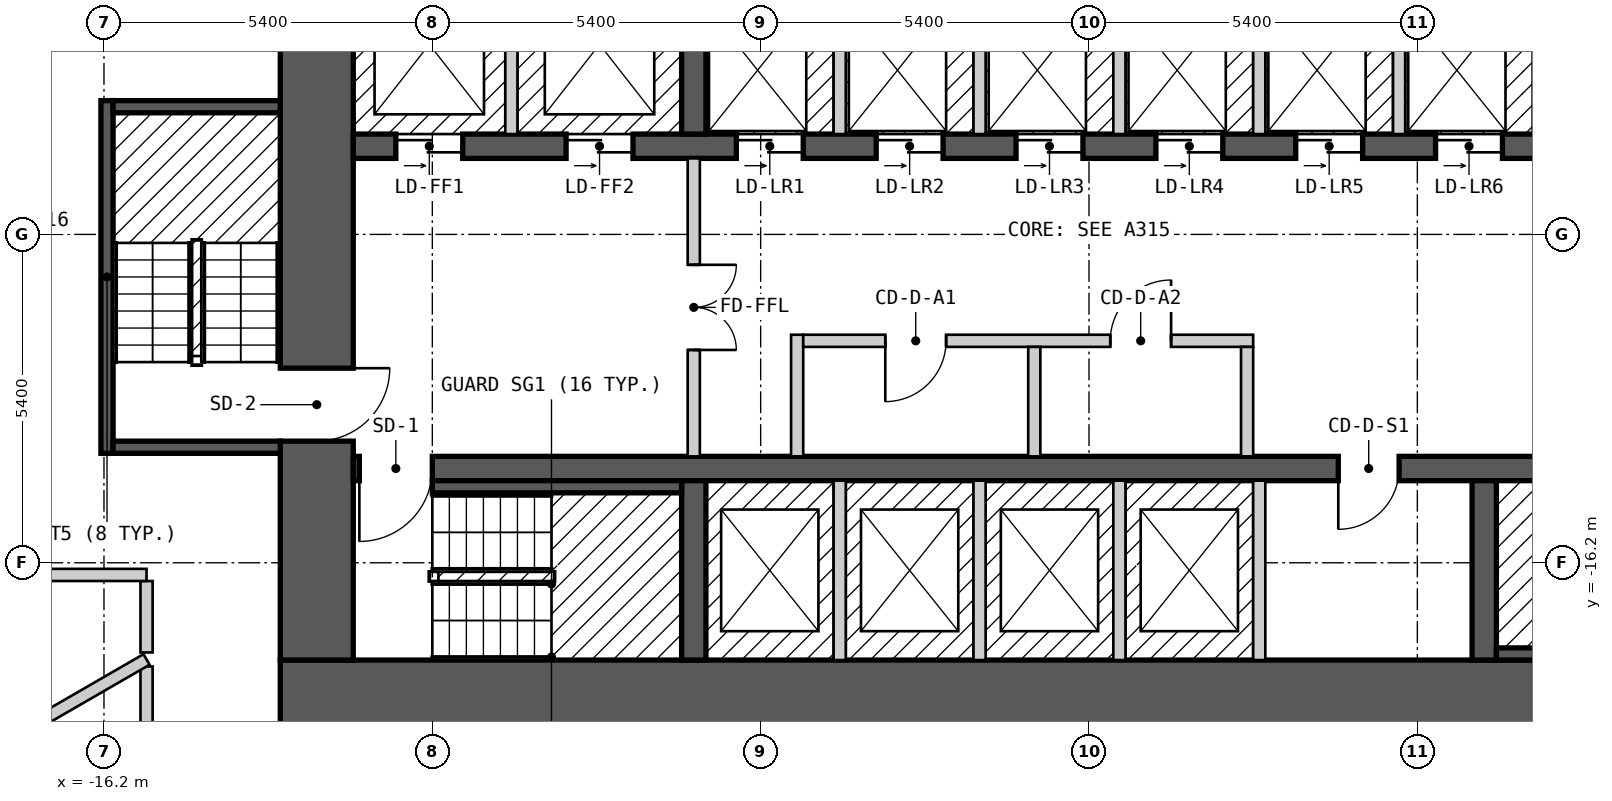
"""IFC4 building model, lengths in metres.
Left out: names, types, materials, properties, quantities, classifications, styles, units other than length and angle.
Written with IfcOpenShell. Run it as: python <this file> out.ifc"""

import sys

from ifc_helpers import new_model, si_unit, direction, frame, frame_2d, origin, place, context, subcontext, project, spatial, rectangle, extrude, element, fill, save


model = new_model("IFC4")
c1 = context("Model", 3, precision=1e-05, world=origin(), true_north=direction((0.0, 1.0)))
c2 = subcontext(c1, "Body", "Model", "MODEL_VIEW")
j1 = project(units=[si_unit("LENGTHUNIT", "METRE"), si_unit("PLANEANGLEUNIT", "RADIAN")], contexts=[c1])
p1 = place(None, origin())
s1 = spatial("IfcSite", under=j1, at=p1, CompositionType="ELEMENT")
p2 = place(p1, origin())
s2 = spatial("IfcBuilding", under=s1, at=p2, CompositionType="ELEMENT")
p3 = place(p2, frame((0.0, 0.0, 44.4)))
s3 = spatial("IfcBuildingStorey", under=s2, at=p3, CompositionType="ELEMENT", Elevation=44.4)
p4 = place(p3, frame((-13.3, -18.4, 0.0), z_axis=(0.0, 0.0, 1.0), x_axis=(1.0, 0.0, 0.0)))
e1 = element("IfcWall", 1, at=p4, inside=s3, PredefinedType="SHEAR", context=c2, shape_type="SweptSolid", body=[
    extrude(rectangle(XDim=26.6, YDim=1.2, at=frame_2d((13.3, 0.0))), origin(), (0.0, 0.0, 1.0), 2.7),
])
p5 = place(p3, frame((-12.7, -17.8, 0.0), z_axis=(0.0, 0.0, 1.0), x_axis=(0.0, 1.0, 0.0)))
e2 = element("IfcWall", 2, at=p5, inside=s3, PredefinedType="SHEAR", context=c2, shape_type="SweptSolid", body=[
    extrude(rectangle(XDim=11.6, YDim=1.2, at=frame_2d((5.8, 0.0))), origin(), (0.0, 0.0, 1.0), 2.7),
])
p6 = place(p5, frame((3.6, 0.0, 0.0)))
e3 = element("IfcOpeningElement", 3, at=p6, cuts=e2, PredefinedType="OPENING", context=c2, shape_type="SweptSolid", body=[
    extrude(rectangle(XDim=1.2, YDim=2.1, at=frame_2d((0.6, 1.05))), frame((0.0, 0.61, 0.0), z_axis=(0.0, -1.0, 0.0), x_axis=(1.0, 0.0, 0.0)), (0.0, 0.0, 1.0), 1.22),
])
p7 = place(p3, frame((-12.1, -14.65, 0.0), z_axis=(0.0, 0.0, 1.0), x_axis=(1.0, 0.0, 0.0)))
e4 = element("IfcWall", 4, at=p7, inside=s3, PredefinedType="SHEAR", context=c2, shape_type="SweptSolid", body=[
    extrude(rectangle(XDim=24.2, YDim=0.4, at=frame_2d((12.1, 0.0))), origin(), (0.0, 0.0, 1.0), 2.7),
])
p8 = place(p7, frame((1.3, 0.0, 0.0), z_axis=(0.0, 0.0, 1.0), x_axis=(-1.0, 0.0, 0.0)))
e5 = element("IfcOpeningElement", 5, at=p8, cuts=e4, PredefinedType="OPENING", context=c2, shape_type="SweptSolid", body=[
    extrude(rectangle(XDim=1.2, YDim=2.1, at=frame_2d((0.6, 1.05))), frame((0.0, 0.21, 0.0), z_axis=(0.0, -1.0, 0.0), x_axis=(1.0, 0.0, 0.0)), (0.0, 0.0, 1.0), 0.42),
])
p9 = place(p7, frame((24.15, 0.0, 0.0), z_axis=(0.0, 0.0, 1.0), x_axis=(-1.0, 0.0, 0.0)))
e6 = element("IfcOpeningElement", 6, at=p9, cuts=e4, PredefinedType="OPENING", context=c2, shape_type="SweptSolid", body=[
    extrude(rectangle(XDim=1.2, YDim=2.1, at=frame_2d((0.6, 1.05))), frame((0.0, 0.21, 0.0), z_axis=(0.0, -1.0, 0.0), x_axis=(1.0, 0.0, 0.0)), (0.0, 0.0, 1.0), 0.42),
])
p10 = place(p7, frame((17.2, 0.0, 0.0), z_axis=(0.0, 0.0, 1.0), x_axis=(-1.0, 0.0, 0.0)))
e7 = element("IfcOpeningElement", 7, at=p10, cuts=e4, PredefinedType="OPENING", context=c2, shape_type="SweptSolid", body=[
    extrude(rectangle(XDim=1.0, YDim=2.1, at=frame_2d((0.5, 1.05))), frame((0.0, 0.21, 0.0), z_axis=(0.0, -1.0, 0.0), x_axis=(1.0, 0.0, 0.0)), (0.0, 0.0, 1.0), 0.42),
])
p11 = place(p3, frame((-12.1, -9.35, 0.0), z_axis=(0.0, 0.0, 1.0), x_axis=(1.0, 0.0, 0.0)))
e8 = element("IfcWall", 8, at=p11, inside=s3, PredefinedType="SHEAR", context=c2, shape_type="SweptSolid", body=[
    extrude(rectangle(XDim=22.3, YDim=0.4, at=frame_2d((11.15, 0.0))), origin(), (0.0, 0.0, 1.0), 2.7),
])
p12 = place(p11, frame((0.7, 0.0, 0.0)))
e9 = element("IfcOpeningElement", 9, at=p12, cuts=e8, PredefinedType="OPENING", context=c2, shape_type="SweptSolid", body=[
    extrude(rectangle(XDim=1.1, YDim=2.1, at=frame_2d((0.55, 1.05))), frame((0.0, 0.21, 0.0), z_axis=(0.0, -1.0, 0.0), x_axis=(1.0, 0.0, 0.0)), (0.0, 0.0, 1.0), 0.42),
])
p13 = place(p11, frame((3.5, 0.0, 0.0)))
e10 = element("IfcOpeningElement", 10, at=p13, cuts=e8, PredefinedType="OPENING", context=c2, shape_type="SweptSolid", body=[
    extrude(rectangle(XDim=1.1, YDim=2.1, at=frame_2d((0.55, 1.05))), frame((0.0, 0.21, 0.0), z_axis=(0.0, -1.0, 0.0), x_axis=(1.0, 0.0, 0.0)), (0.0, 0.0, 1.0), 0.42),
])
p14 = place(p11, frame((6.3, 0.0, 0.0)))
e11 = element("IfcOpeningElement", 11, at=p14, cuts=e8, PredefinedType="OPENING", context=c2, shape_type="SweptSolid", body=[
    extrude(rectangle(XDim=1.1, YDim=2.1, at=frame_2d((0.55, 1.05))), frame((0.0, 0.21, 0.0), z_axis=(0.0, -1.0, 0.0), x_axis=(1.0, 0.0, 0.0)), (0.0, 0.0, 1.0), 0.42),
])
p15 = place(p11, frame((8.6, 0.0, 0.0)))
e12 = element("IfcOpeningElement", 12, at=p15, cuts=e8, PredefinedType="OPENING", context=c2, shape_type="SweptSolid", body=[
    extrude(rectangle(XDim=1.1, YDim=2.1, at=frame_2d((0.55, 1.05))), frame((0.0, 0.21, 0.0), z_axis=(0.0, -1.0, 0.0), x_axis=(1.0, 0.0, 0.0)), (0.0, 0.0, 1.0), 0.42),
])
p16 = place(p11, frame((10.9, 0.0, 0.0)))
e13 = element("IfcOpeningElement", 13, at=p16, cuts=e8, PredefinedType="OPENING", context=c2, shape_type="SweptSolid", body=[
    extrude(rectangle(XDim=1.1, YDim=2.1, at=frame_2d((0.55, 1.05))), frame((0.0, 0.21, 0.0), z_axis=(0.0, -1.0, 0.0), x_axis=(1.0, 0.0, 0.0)), (0.0, 0.0, 1.0), 0.42),
])
p17 = place(p11, frame((13.2, 0.0, 0.0)))
e14 = element("IfcOpeningElement", 14, at=p17, cuts=e8, PredefinedType="OPENING", context=c2, shape_type="SweptSolid", body=[
    extrude(rectangle(XDim=1.1, YDim=2.1, at=frame_2d((0.55, 1.05))), frame((0.0, 0.21, 0.0), z_axis=(0.0, -1.0, 0.0), x_axis=(1.0, 0.0, 0.0)), (0.0, 0.0, 1.0), 0.42),
])
p18 = place(p11, frame((15.5, 0.0, 0.0)))
e15 = element("IfcOpeningElement", 15, at=p18, cuts=e8, PredefinedType="OPENING", context=c2, shape_type="SweptSolid", body=[
    extrude(rectangle(XDim=1.1, YDim=2.1, at=frame_2d((0.55, 1.05))), frame((0.0, 0.21, 0.0), z_axis=(0.0, -1.0, 0.0), x_axis=(1.0, 0.0, 0.0)), (0.0, 0.0, 1.0), 0.42),
])
p19 = place(p11, frame((17.8, 0.0, 0.0)))
e16 = element("IfcOpeningElement", 16, at=p19, cuts=e8, PredefinedType="OPENING", context=c2, shape_type="SweptSolid", body=[
    extrude(rectangle(XDim=1.1, YDim=2.1, at=frame_2d((0.55, 1.05))), frame((0.0, 0.21, 0.0), z_axis=(0.0, -1.0, 0.0), x_axis=(1.0, 0.0, 0.0)), (0.0, 0.0, 1.0), 0.42),
])
p20 = place(p11, frame((20.2, 0.0, 0.0)))
e17 = element("IfcOpeningElement", 17, at=p20, cuts=e8, PredefinedType="OPENING", context=c2, shape_type="SweptSolid", body=[
    extrude(rectangle(XDim=1.1, YDim=2.1, at=frame_2d((0.55, 1.05))), frame((0.0, 0.21, 0.0), z_axis=(0.0, -1.0, 0.0), x_axis=(1.0, 0.0, 0.0)), (0.0, 0.0, 1.0), 0.42),
])
for number, where, z_axis, x_axis in (
    (18, (-6.5, -17.8, 0.0), (0.0, 0.0, 1.0), (0.0, 1.0, 0.0)),
    (19, (6.5, -17.8, 0.0), (0.0, 0.0, 1.0), (0.0, 1.0, 0.0)),
    (20, (-6.5, -9.15, 0.0), (0.0, 0.0, 1.0), (0.0, 1.0, 0.0)),
):
    element("IfcWall", number, at=place(p3, frame(where, z_axis=z_axis, x_axis=x_axis)), inside=s3, PredefinedType="SHEAR", context=c2, shape_type="SweptSolid", body=[
        extrude(rectangle(XDim=2.95, YDim=0.4, at=frame_2d((1.475, 0.0))), origin(), (0.0, 0.0, 1.0), 2.7),
    ])
p21 = place(p3, frame((-15.5, -16.5, 0.0), z_axis=(0.0, 0.0, 1.0), x_axis=(0.0, -1.0, 0.0)))
e21 = element("IfcWall", 21, at=p21, inside=s3, PredefinedType="PARTITIONING", context=c2, shape_type="SweptSolid", body=[
    extrude(rectangle(XDim=1.175, YDim=0.2, at=frame_2d((0.587, 0.0))), origin(), (0.0, 0.0, 1.0), 2.7),
])
p22 = place(p3, frame((-18.249, -16.4, 0.0), z_axis=(0.0, 0.0, 1.0), x_axis=(1.0, 0.0, 0.0)))
e22 = element("IfcWall", 22, at=p22, inside=s3, PredefinedType="PARTITIONING", context=c2, shape_type="SweptSolid", body=[
    extrude(rectangle(XDim=2.749, YDim=0.2, at=frame_2d((1.375, 0.0))), origin(), (0.0, 0.0, 1.0), 2.7),
])
p23 = place(p3, frame((-15.5, -21.2, 0.0), z_axis=(0.0, 0.0, 1.0), x_axis=(0.0, 1.0, 0.0)))
e23 = element("IfcWall", 23, at=p23, inside=s3, PredefinedType="PARTITIONING", context=c2, shape_type="SweptSolid", body=[
    extrude(rectangle(XDim=3.294, YDim=0.2, at=frame_2d((1.647, 0.0))), origin(), (0.0, 0.0, 1.0), 2.7),
])
p24 = place(p23, frame((1.258, 0.0, 0.0)))
e24 = element("IfcOpeningElement", 24, at=p24, cuts=e23, PredefinedType="OPENING", context=c2, shape_type="SweptSolid", body=[
    extrude(rectangle(XDim=0.8, YDim=2.1, at=frame_2d((0.4, 1.05))), frame((0.0, 0.11, 0.0), z_axis=(0.0, -1.0, 0.0), x_axis=(1.0, 0.0, 0.0)), (0.0, 0.0, 1.0), 0.22),
])
p25 = place(p3, frame((-20.507, -20.681, 0.0), z_axis=(0.0, 0.0, 1.0), x_axis=(0.86602314875, 0.500003905814, 0.0)))
e25 = element("IfcWall", 25, at=p25, inside=s3, PredefinedType="PARTITIONING", context=c2, shape_type="SweptSolid", body=[
    extrude(rectangle(XDim=5.782, YDim=0.2, at=frame_2d((2.891, 0.0))), origin(), (0.0, 0.0, 1.0), 2.7),
])
p26 = place(p3, frame((-16.15, -14.4, 0.0), z_axis=(0.0, 0.0, 1.0), x_axis=(0.0, 1.0, 0.0)))
e26 = element("IfcWall", 26, at=p26, inside=s3, PredefinedType="SOLIDWALL", context=c2, shape_type="SweptSolid", body=[
    extrude(rectangle(XDim=5.8, YDim=0.2, at=frame_2d((2.9, 0.0))), origin(), (0.0, 0.0, 1.0), 2.7),
])
for number, where, z_axis, x_axis in (
    (27, (-16.05, -14.3, 0.0), (0.0, 0.0, 1.0), (1.0, 0.0, 0.0)),
    (28, (-16.05, -8.7, 0.0), (0.0, 0.0, 1.0), (1.0, 0.0, 0.0)),
):
    element("IfcWall", number, at=place(p3, frame(where, z_axis=z_axis, x_axis=x_axis)), inside=s3, PredefinedType="SOLIDWALL", context=c2, shape_type="SweptSolid", body=[
        extrude(rectangle(XDim=2.75, YDim=0.2, at=frame_2d((1.375, 0.0))), origin(), (0.0, 0.0, 1.0), 2.7),
    ])
p27 = place(p3, frame((-10.8, -14.95, 0.0), z_axis=(0.0, 0.0, 1.0), x_axis=(1.0, 0.0, 0.0)))
e29 = element("IfcWall", 29, at=p27, inside=s3, PredefinedType="SOLIDWALL", context=c2, shape_type="SweptSolid", body=[
    extrude(rectangle(XDim=4.1, YDim=0.2, at=frame_2d((2.05, 0.0))), origin(), (0.0, 0.0, 1.0), 2.7),
])
p28 = place(p3, frame((-9.5, -9.15, 0.0), z_axis=(0.0, 0.0, 1.0), x_axis=(0.0, 1.0, 0.0)))
e30 = element("IfcWall", 30, at=p28, inside=s3, PredefinedType="SOLIDWALL", context=c2, shape_type="SweptSolid", body=[
    extrude(rectangle(XDim=2.95, YDim=0.2, at=frame_2d((1.475, 0.0))), origin(), (0.0, 0.0, 1.0), 2.7),
])
p29 = place(p3, frame((-6.5, -14.45, 0.0), z_axis=(0.0, 0.0, 1.0), x_axis=(0.0, 1.0, 0.0)))
e31 = element("IfcWall", 31, at=p29, inside=s3, PredefinedType="PARTITIONING", context=c2, shape_type="SweptSolid", body=[
    extrude(rectangle(XDim=4.9, YDim=0.2, at=frame_2d((2.45, 0.0))), origin(), (0.0, 0.0, 1.0), 2.7),
])
p30 = place(p29, frame((3.15, 0.0, 0.0), z_axis=(0.0, 0.0, 1.0), x_axis=(-1.0, 0.0, 0.0)))
e32 = element("IfcOpeningElement", 32, at=p30, cuts=e31, PredefinedType="OPENING", context=c2, shape_type="SweptSolid", body=[
    extrude(rectangle(XDim=1.4, YDim=2.1, at=frame_2d((0.7, 1.05))), frame((0.0, 0.11, 0.0), z_axis=(0.0, -1.0, 0.0), x_axis=(1.0, 0.0, 0.0)), (0.0, 0.0, 1.0), 0.22),
])
p31 = place(p3, frame((-4.8, -14.45, 0.0), z_axis=(0.0, 0.0, 1.0), x_axis=(0.0, 1.0, 0.0)))
e33 = element("IfcWall", 33, at=p31, inside=s3, PredefinedType="PARTITIONING", context=c2, shape_type="SweptSolid", body=[
    extrude(rectangle(XDim=2.0, YDim=0.2, at=frame_2d((1.0, 0.0))), origin(), (0.0, 0.0, 1.0), 2.7),
])
p32 = place(p3, frame((-4.7, -12.55, 0.0), z_axis=(0.0, 0.0, 1.0), x_axis=(1.0, 0.0, 0.0)))
e34 = element("IfcWall", 34, at=p32, inside=s3, PredefinedType="PARTITIONING", context=c2, shape_type="SweptSolid", body=[
    extrude(rectangle(XDim=7.4, YDim=0.2, at=frame_2d((3.7, 0.0))), origin(), (0.0, 0.0, 1.0), 2.7),
])
p33 = place(p32, frame((2.35, 0.0, 0.0), z_axis=(0.0, 0.0, 1.0), x_axis=(-1.0, 0.0, 0.0)))
e35 = element("IfcOpeningElement", 35, at=p33, cuts=e34, PredefinedType="OPENING", context=c2, shape_type="SweptSolid", body=[
    extrude(rectangle(XDim=1.0, YDim=2.1, at=frame_2d((0.5, 1.05))), frame((0.0, 0.11, 0.0), z_axis=(0.0, -1.0, 0.0), x_axis=(1.0, 0.0, 0.0)), (0.0, 0.0, 1.0), 0.22),
])
p34 = place(p32, frame((6.05, 0.0, 0.0), z_axis=(0.0, 0.0, 1.0), x_axis=(-1.0, 0.0, 0.0)))
e36 = element("IfcOpeningElement", 36, at=p34, cuts=e34, PredefinedType="OPENING", context=c2, shape_type="SweptSolid", body=[
    extrude(rectangle(XDim=1.0, YDim=2.1, at=frame_2d((0.5, 1.05))), frame((0.0, 0.11, 0.0), z_axis=(0.0, -1.0, 0.0), x_axis=(1.0, 0.0, 0.0)), (0.0, 0.0, 1.0), 0.22),
])
for number, where, z_axis, x_axis in (
    (37, (-4.1, -17.8, 0.0), (0.0, 0.0, 1.0), (0.0, 1.0, 0.0)),
    (38, (-4.1, -9.15, 0.0), (0.0, 0.0, 1.0), (0.0, 1.0, 0.0)),
    (39, (-1.8, -17.8, 0.0), (0.0, 0.0, 1.0), (0.0, 1.0, 0.0)),
    (40, (-1.8, -9.15, 0.0), (0.0, 0.0, 1.0), (0.0, 1.0, 0.0)),
):
    element("IfcWall", number, at=place(p3, frame(where, z_axis=z_axis, x_axis=x_axis)), inside=s3, PredefinedType="SOLIDWALL", context=c2, shape_type="SweptSolid", body=[
        extrude(rectangle(XDim=2.95, YDim=0.2, at=frame_2d((1.475, 0.0))), origin(), (0.0, 0.0, 1.0), 2.7),
    ])
p35 = place(p3, frame((-0.9, -14.45, 0.0), z_axis=(0.0, 0.0, 1.0), x_axis=(0.0, 1.0, 0.0)))
e41 = element("IfcWall", 41, at=p35, inside=s3, PredefinedType="PARTITIONING", context=c2, shape_type="SweptSolid", body=[
    extrude(rectangle(XDim=1.8, YDim=0.2, at=frame_2d((0.9, 0.0))), origin(), (0.0, 0.0, 1.0), 2.7),
])
for number, where, z_axis, x_axis in (
    (42, (0.5, -17.8, 0.0), (0.0, 0.0, 1.0), (0.0, 1.0, 0.0)),
    (43, (0.5, -9.15, 0.0), (0.0, 0.0, 1.0), (0.0, 1.0, 0.0)),
):
    element("IfcWall", number, at=place(p3, frame(where, z_axis=z_axis, x_axis=x_axis)), inside=s3, PredefinedType="SOLIDWALL", context=c2, shape_type="SweptSolid", body=[
        extrude(rectangle(XDim=2.95, YDim=0.2, at=frame_2d((1.475, 0.0))), origin(), (0.0, 0.0, 1.0), 2.7),
    ])
p36 = place(p3, frame((2.6, -14.45, 0.0), z_axis=(0.0, 0.0, 1.0), x_axis=(0.0, 1.0, 0.0)))
e44 = element("IfcWall", 44, at=p36, inside=s3, PredefinedType="PARTITIONING", context=c2, shape_type="SweptSolid", body=[
    extrude(rectangle(XDim=1.8, YDim=0.2, at=frame_2d((0.9, 0.0))), origin(), (0.0, 0.0, 1.0), 2.7),
])
for number, where, z_axis, x_axis in (
    (45, (2.8, -17.8, 0.0), (0.0, 0.0, 1.0), (0.0, 1.0, 0.0)),
    (46, (2.8, -9.15, 0.0), (0.0, 0.0, 1.0), (0.0, 1.0, 0.0)),
    (47, (5.1, -9.15, 0.0), (0.0, 0.0, 1.0), (0.0, 1.0, 0.0)),
):
    element("IfcWall", number, at=place(p3, frame(where, z_axis=z_axis, x_axis=x_axis)), inside=s3, PredefinedType="SOLIDWALL", context=c2, shape_type="SweptSolid", body=[
        extrude(rectangle(XDim=2.95, YDim=0.2, at=frame_2d((1.475, 0.0))), origin(), (0.0, 0.0, 1.0), 2.7),
    ])
p37 = place(p3, frame((6.7, -17.7, 0.0), z_axis=(0.0, 0.0, 1.0), x_axis=(1.0, 0.0, 0.0)))
e48 = element("IfcWall", 48, at=p37, inside=s3, PredefinedType="SOLIDWALL", context=c2, shape_type="SweptSolid", body=[
    extrude(rectangle(XDim=5.4, YDim=0.2, at=frame_2d((2.7, 0.0))), origin(), (0.0, 0.0, 1.0), 2.7),
])
p38 = place(p3, frame((7.4, -9.15, 0.0), z_axis=(0.0, 0.0, 1.0), x_axis=(0.0, 1.0, 0.0)))
e49 = element("IfcWall", 49, at=p38, inside=s3, PredefinedType="SOLIDWALL", context=c2, shape_type="SweptSolid", body=[
    extrude(rectangle(XDim=2.95, YDim=0.2, at=frame_2d((1.475, 0.0))), origin(), (0.0, 0.0, 1.0), 2.7),
])
p39 = place(p12, origin())
e50 = element("IfcDoor", 50, at=p39, inside=s3, OperationType="DOUBLE_DOOR_SLIDING", PredefinedType="DOOR", context=c2, shape_type="SweptSolid", body=[
    extrude(rectangle(XDim=1.1, YDim=2.1, at=frame_2d((0.55, 1.05))), frame((0.0, 0.025, 0.0), z_axis=(0.0, -1.0, 0.0), x_axis=(1.0, 0.0, 0.0)), (0.0, 0.0, 1.0), 0.05),
])
fill(e9, e50)
p40 = place(p13, origin())
e51 = element("IfcDoor", 51, at=p40, inside=s3, OperationType="DOUBLE_DOOR_SLIDING", PredefinedType="DOOR", context=c2, shape_type="SweptSolid", body=[
    extrude(rectangle(XDim=1.1, YDim=2.1, at=frame_2d((0.55, 1.05))), frame((0.0, 0.025, 0.0), z_axis=(0.0, -1.0, 0.0), x_axis=(1.0, 0.0, 0.0)), (0.0, 0.0, 1.0), 0.05),
])
fill(e10, e51)
p41 = place(p14, origin())
e52 = element("IfcDoor", 52, at=p41, inside=s3, OperationType="DOUBLE_DOOR_SLIDING", PredefinedType="DOOR", context=c2, shape_type="SweptSolid", body=[
    extrude(rectangle(XDim=1.1, YDim=2.1, at=frame_2d((0.55, 1.05))), frame((0.0, 0.025, 0.0), z_axis=(0.0, -1.0, 0.0), x_axis=(1.0, 0.0, 0.0)), (0.0, 0.0, 1.0), 0.05),
])
fill(e11, e52)
p42 = place(p15, origin())
e53 = element("IfcDoor", 53, at=p42, inside=s3, OperationType="DOUBLE_DOOR_SLIDING", PredefinedType="DOOR", context=c2, shape_type="SweptSolid", body=[
    extrude(rectangle(XDim=1.1, YDim=2.1, at=frame_2d((0.55, 1.05))), frame((0.0, 0.025, 0.0), z_axis=(0.0, -1.0, 0.0), x_axis=(1.0, 0.0, 0.0)), (0.0, 0.0, 1.0), 0.05),
])
fill(e12, e53)
p43 = place(p16, origin())
e54 = element("IfcDoor", 54, at=p43, inside=s3, OperationType="DOUBLE_DOOR_SLIDING", PredefinedType="DOOR", context=c2, shape_type="SweptSolid", body=[
    extrude(rectangle(XDim=1.1, YDim=2.1, at=frame_2d((0.55, 1.05))), frame((0.0, 0.025, 0.0), z_axis=(0.0, -1.0, 0.0), x_axis=(1.0, 0.0, 0.0)), (0.0, 0.0, 1.0), 0.05),
])
fill(e13, e54)
p44 = place(p17, origin())
e55 = element("IfcDoor", 55, at=p44, inside=s3, OperationType="DOUBLE_DOOR_SLIDING", PredefinedType="DOOR", context=c2, shape_type="SweptSolid", body=[
    extrude(rectangle(XDim=1.1, YDim=2.1, at=frame_2d((0.55, 1.05))), frame((0.0, 0.025, 0.0), z_axis=(0.0, -1.0, 0.0), x_axis=(1.0, 0.0, 0.0)), (0.0, 0.0, 1.0), 0.05),
])
fill(e14, e55)
p45 = place(p18, origin())
e56 = element("IfcDoor", 56, at=p45, inside=s3, OperationType="DOUBLE_DOOR_SLIDING", PredefinedType="DOOR", context=c2, shape_type="SweptSolid", body=[
    extrude(rectangle(XDim=1.1, YDim=2.1, at=frame_2d((0.55, 1.05))), frame((0.0, 0.025, 0.0), z_axis=(0.0, -1.0, 0.0), x_axis=(1.0, 0.0, 0.0)), (0.0, 0.0, 1.0), 0.05),
])
fill(e15, e56)
p46 = place(p19, origin())
e57 = element("IfcDoor", 57, at=p46, inside=s3, OperationType="DOUBLE_DOOR_SLIDING", PredefinedType="DOOR", context=c2, shape_type="SweptSolid", body=[
    extrude(rectangle(XDim=1.1, YDim=2.1, at=frame_2d((0.55, 1.05))), frame((0.0, 0.025, 0.0), z_axis=(0.0, -1.0, 0.0), x_axis=(1.0, 0.0, 0.0)), (0.0, 0.0, 1.0), 0.05),
])
fill(e16, e57)
p47 = place(p8, origin())
e58 = element("IfcDoor", 58, at=p47, inside=s3, OperationType="SINGLE_SWING_RIGHT", PredefinedType="DOOR", context=c2, shape_type="SweptSolid", body=[
    extrude(rectangle(XDim=1.2, YDim=2.1, at=frame_2d((0.6, 1.05))), frame((0.0, 0.025, 0.0), z_axis=(0.0, -1.0, 0.0), x_axis=(1.0, 0.0, 0.0)), (0.0, 0.0, 1.0), 0.05),
])
fill(e5, e58)
p48 = place(p6, origin())
e59 = element("IfcDoor", 59, at=p48, inside=s3, OperationType="SINGLE_SWING_RIGHT", PredefinedType="DOOR", context=c2, shape_type="SweptSolid", body=[
    extrude(rectangle(XDim=1.2, YDim=2.1, at=frame_2d((0.6, 1.05))), frame((0.0, 0.025, 0.0), z_axis=(0.0, -1.0, 0.0), x_axis=(1.0, 0.0, 0.0)), (0.0, 0.0, 1.0), 0.05),
])
fill(e3, e59)
p49 = place(p30, origin())
e60 = element("IfcDoor", 60, at=p49, inside=s3, OperationType="DOUBLE_DOOR_SINGLE_SWING", PredefinedType="DOOR", context=c2, shape_type="SweptSolid", body=[
    extrude(rectangle(XDim=1.4, YDim=2.1, at=frame_2d((0.7, 1.05))), frame((0.0, 0.025, 0.0), z_axis=(0.0, -1.0, 0.0), x_axis=(1.0, 0.0, 0.0)), (0.0, 0.0, 1.0), 0.05),
])
fill(e32, e60)
p50 = place(p33, origin())
e61 = element("IfcDoor", 61, at=p50, inside=s3, OperationType="SINGLE_SWING_RIGHT", PredefinedType="DOOR", context=c2, shape_type="SweptSolid", body=[
    extrude(rectangle(XDim=1.0, YDim=2.1, at=frame_2d((0.5, 1.05))), frame((0.0, 0.025, 0.0), z_axis=(0.0, -1.0, 0.0), x_axis=(1.0, 0.0, 0.0)), (0.0, 0.0, 1.0), 0.05),
])
fill(e35, e61)
p51 = place(p34, origin())
e62 = element("IfcDoor", 62, at=p51, inside=s3, OperationType="SINGLE_SWING_LEFT", PredefinedType="DOOR", context=c2, shape_type="SweptSolid", body=[
    extrude(rectangle(XDim=1.0, YDim=2.1, at=frame_2d((0.5, 1.05))), frame((0.0, 0.025, 0.0), z_axis=(0.0, -1.0, 0.0), x_axis=(1.0, 0.0, 0.0)), (0.0, 0.0, 1.0), 0.05),
])
fill(e36, e62)
p52 = place(p10, origin())
e63 = element("IfcDoor", 63, at=p52, inside=s3, OperationType="SINGLE_SWING_RIGHT", PredefinedType="DOOR", context=c2, shape_type="SweptSolid", body=[
    extrude(rectangle(XDim=1.0, YDim=2.1, at=frame_2d((0.5, 1.05))), frame((0.0, 0.025, 0.0), z_axis=(0.0, -1.0, 0.0), x_axis=(1.0, 0.0, 0.0)), (0.0, 0.0, 1.0), 0.05),
])
fill(e7, e63)
save(model, sys.argv[1])
